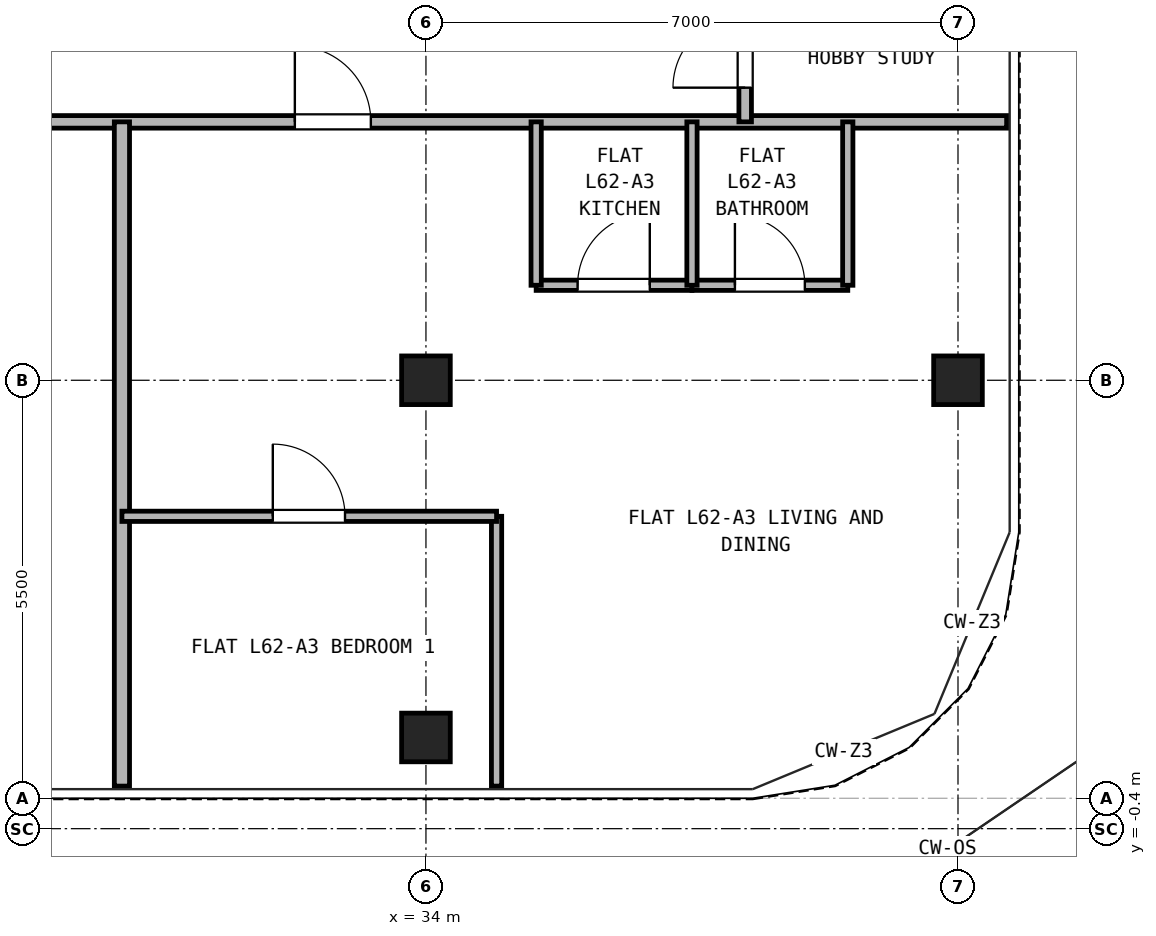
"""IFC4 building model, lengths in metres.
Left out: names, types, materials, properties, quantities, classifications, styles, units other than length and angle.
Written with IfcOpenShell. Run it as: python <this file> out.ifc"""

import sys

from ifc_helpers import new_model, si_unit, direction, frame, frame_2d, origin, origin_2d, place, context, subcontext, project, spatial, rectangle, hollow_rectangle, extrude, source, transform, mapped, element, fill, save


model = new_model("IFC4")
c1 = context("Model", 3, precision=1e-05, world=origin(), true_north=direction((0.0, 1.0)))
c2 = subcontext(c1, "Body", "Model", "MODEL_VIEW")
j1 = project(units=[si_unit("LENGTHUNIT", "METRE"), si_unit("PLANEANGLEUNIT", "RADIAN")], contexts=[c1])
p1 = place(None, origin())
s1 = spatial("IfcSite", under=j1, at=p1, CompositionType="ELEMENT")
p2 = place(p1, origin())
s2 = spatial("IfcBuilding", under=s1, at=p2, CompositionType="ELEMENT")
p3 = place(p2, frame((0.0, 0.0, 220.1)))
s3 = spatial("IfcBuildingStorey", under=s2, at=p3, CompositionType="ELEMENT", Elevation=220.1)
m1 = source(origin(), c2, "Body", "SweptSolid", [
    extrude(hollow_rectangle(XDim=0.64, YDim=0.64, WallThickness=0.035, at=origin_2d()), origin(), (0.0, 0.0, 1.0), 2.98),
])
for number, where, z_axis, x_axis in (
    (1, (34.0, 0.8, 0.0), (0.0, 0.0, 1.0), (1.0, 0.0, 0.0)),
    (2, (41.0, 5.5, 0.0), (0.0, 0.0, 1.0), (1.0, 0.0, 0.0)),
    (3, (34.0, 5.5, 0.0), (0.0, 0.0, 1.0), (1.0, 0.0, 0.0)),
):
    element("IfcColumn", number, at=place(p3, frame(where, z_axis=z_axis, x_axis=x_axis)), inside=s3, PredefinedType="COLUMN", context=c2, shape_type="MappedRepresentation", body=[
        mapped(m1, transform((0.0, 0.0, 0.0), x_axis=(1.0, 0.0, 0.0), y_axis=(0.0, 1.0, 0.0), z_axis=(0.0, 0.0, 1.0), scale=1.0)),
    ])
p4 = place(p3, frame((5.36, 8.9, 0.0), z_axis=(0.0, 0.0, 1.0), x_axis=(1.0, 0.0, 0.0)))
e4 = element("IfcWall", 4, at=p4, inside=s3, PredefinedType="PARTITIONING", context=c2, shape_type="SweptSolid", body=[
    extrude(rectangle(XDim=36.28, YDim=0.165, at=frame_2d((18.14, 0.0))), origin(), (0.0, 0.0, 1.0), 2.98),
])
p5 = place(p4, frame((8.865, 0.0, 0.0)))
e5 = element("IfcOpeningElement", 5, at=p5, cuts=e4, PredefinedType="OPENING", context=c2, shape_type="SweptSolid", body=[
    extrude(rectangle(XDim=1.0, YDim=2.15, at=frame_2d((0.5, 1.075))), frame((0.0, 0.093, 0.0), z_axis=(0.0, -1.0, 0.0), x_axis=(1.0, 0.0, 0.0)), (0.0, 0.0, 1.0), 0.185),
])
p6 = place(p4, frame((14.665, 0.0, 0.0)))
e6 = element("IfcOpeningElement", 6, at=p6, cuts=e4, PredefinedType="OPENING", context=c2, shape_type="SweptSolid", body=[
    extrude(rectangle(XDim=1.0, YDim=2.15, at=frame_2d((0.5, 1.075))), frame((0.0, 0.093, 0.0), z_axis=(0.0, -1.0, 0.0), x_axis=(1.0, 0.0, 0.0)), (0.0, 0.0, 1.0), 0.185),
])
p7 = place(p4, frame((26.915, 0.0, 0.0)))
e7 = element("IfcOpeningElement", 7, at=p7, cuts=e4, PredefinedType="OPENING", context=c2, shape_type="SweptSolid", body=[
    extrude(rectangle(XDim=1.0, YDim=2.15, at=frame_2d((0.5, 1.075))), frame((0.0, 0.093, 0.0), z_axis=(0.0, -1.0, 0.0), x_axis=(1.0, 0.0, 0.0)), (0.0, 0.0, 1.0), 0.185),
])
p8 = place(p3, frame((38.2, 8.9, 0.0), z_axis=(0.0, 0.0, 1.0), x_axis=(0.0, 1.0, 0.0)))
e8 = element("IfcWall", 8, at=p8, inside=s3, PredefinedType="PARTITIONING", context=c2, shape_type="SweptSolid", body=[
    extrude(rectangle(XDim=2.0, YDim=0.165, at=frame_2d((1.0, 0.0))), origin(), (0.0, 0.0, 1.0), 2.98),
])
p9 = place(p8, frame((0.45, 0.0, 0.0)))
e9 = element("IfcOpeningElement", 9, at=p9, cuts=e8, PredefinedType="OPENING", context=c2, shape_type="SweptSolid", body=[
    extrude(rectangle(XDim=0.95, YDim=2.15, at=frame_2d((0.475, 1.075))), frame((0.0, 0.093, 0.0), z_axis=(0.0, -1.0, 0.0), x_axis=(1.0, 0.0, 0.0)), (0.0, 0.0, 1.0), 0.185),
])
p10 = place(p3, frame((30.0, 0.16, 0.0), z_axis=(0.0, 0.0, 1.0), x_axis=(0.0, 1.0, 0.0)))
e10 = element("IfcWall", 10, at=p10, inside=s3, PredefinedType="PARTITIONING", context=c2, shape_type="SweptSolid", body=[
    extrude(rectangle(XDim=8.74, YDim=0.2, at=frame_2d((4.37, 0.0))), origin(), (0.0, 0.0, 1.0), 2.98),
])
p11 = place(p3, frame((35.45, 6.75, 0.0), z_axis=(0.0, 0.0, 1.0), x_axis=(1.0, 0.0, 0.0)))
e11 = element("IfcWall", 11, at=p11, inside=s3, PredefinedType="PARTITIONING", context=c2, shape_type="SweptSolid", body=[
    extrude(rectangle(XDim=2.05, YDim=0.135, at=frame_2d((1.025, 0.0))), origin(), (0.0, 0.0, 1.0), 2.98),
])
p12 = place(p11, frame((0.545, 0.0, 0.0)))
e12 = element("IfcOpeningElement", 12, at=p12, cuts=e11, PredefinedType="OPENING", context=c2, shape_type="SweptSolid", body=[
    extrude(rectangle(XDim=0.95, YDim=2.15, at=frame_2d((0.475, 1.075))), frame((0.0, 0.077, 0.0), z_axis=(0.0, -1.0, 0.0), x_axis=(1.0, 0.0, 0.0)), (0.0, 0.0, 1.0), 0.155),
])
p13 = place(p3, frame((37.5, 6.75, 0.0), z_axis=(0.0, 0.0, 1.0), x_axis=(1.0, 0.0, 0.0)))
e13 = element("IfcWall", 13, at=p13, inside=s3, PredefinedType="PARTITIONING", context=c2, shape_type="SweptSolid", body=[
    extrude(rectangle(XDim=2.05, YDim=0.135, at=frame_2d((1.025, 0.0))), origin(), (0.0, 0.0, 1.0), 2.98),
])
p14 = place(p13, frame((0.565, 0.0, 0.0)))
e14 = element("IfcOpeningElement", 14, at=p14, cuts=e13, PredefinedType="OPENING", context=c2, shape_type="SweptSolid", body=[
    extrude(rectangle(XDim=0.92, YDim=2.1, at=frame_2d((0.46, 1.05))), frame((0.0, 0.077, 0.0), z_axis=(0.0, -1.0, 0.0), x_axis=(1.0, 0.0, 0.0)), (0.0, 0.0, 1.0), 0.155),
])
for number, where, z_axis, x_axis in (
    (15, (35.45, 6.75, 0.0), (0.0, 0.0, 1.0), (0.0, 1.0, 0.0)),
    (16, (37.5, 6.75, 0.0), (0.0, 0.0, 1.0), (0.0, 1.0, 0.0)),
    (17, (39.55, 6.75, 0.0), (0.0, 0.0, 1.0), (0.0, 1.0, 0.0)),
):
    element("IfcWall", number, at=place(p3, frame(where, z_axis=z_axis, x_axis=x_axis)), inside=s3, PredefinedType="PARTITIONING", context=c2, shape_type="SweptSolid", body=[
        extrude(rectangle(XDim=2.15, YDim=0.135, at=frame_2d((1.075, 0.0))), origin(), (0.0, 0.0, 1.0), 2.98),
    ])
p15 = place(p3, frame((34.929, 0.16, 0.0), z_axis=(0.0, 0.0, 1.0), x_axis=(0.0, 1.0, 0.0)))
e18 = element("IfcWall", 18, at=p15, inside=s3, PredefinedType="PARTITIONING", context=c2, shape_type="SweptSolid", body=[
    extrude(rectangle(XDim=3.55, YDim=0.135, at=frame_2d((1.775, 0.0))), origin(), (0.0, 0.0, 1.0), 2.98),
])
p16 = place(p3, frame((30.0, 3.71, 0.0), z_axis=(0.0, 0.0, 1.0), x_axis=(1.0, 0.0, 0.0)))
e19 = element("IfcWall", 19, at=p16, inside=s3, PredefinedType="PARTITIONING", context=c2, shape_type="SweptSolid", body=[
    extrude(rectangle(XDim=4.929, YDim=0.135, at=frame_2d((2.464, 0.0))), origin(), (0.0, 0.0, 1.0), 2.98),
])
p17 = place(p16, frame((1.985, 0.0, 0.0)))
e20 = element("IfcOpeningElement", 20, at=p17, cuts=e19, PredefinedType="OPENING", context=c2, shape_type="SweptSolid", body=[
    extrude(rectangle(XDim=0.95, YDim=2.15, at=frame_2d((0.475, 1.075))), frame((0.0, 0.077, 0.0), z_axis=(0.0, -1.0, 0.0), x_axis=(1.0, 0.0, 0.0)), (0.0, 0.0, 1.0), 0.155),
])
p18 = place(p12, origin())
e21 = element("IfcDoor", 21, at=p18, inside=s3, OperationType="SINGLE_SWING_RIGHT", PredefinedType="DOOR", context=c2, shape_type="SweptSolid", body=[
    extrude(rectangle(XDim=0.95, YDim=2.15, at=frame_2d((0.475, 1.075))), frame((0.0, 0.025, 0.0), z_axis=(0.0, -1.0, 0.0), x_axis=(1.0, 0.0, 0.0)), (0.0, 0.0, 1.0), 0.05),
])
fill(e12, e21)
p19 = place(p14, origin())
e22 = element("IfcDoor", 22, at=p19, inside=s3, OperationType="SINGLE_SWING_LEFT", PredefinedType="DOOR", context=c2, shape_type="SweptSolid", body=[
    extrude(rectangle(XDim=0.92, YDim=2.1, at=frame_2d((0.46, 1.05))), frame((0.0, 0.025, 0.0), z_axis=(0.0, -1.0, 0.0), x_axis=(1.0, 0.0, 0.0)), (0.0, 0.0, 1.0), 0.05),
])
fill(e14, e22)
p20 = place(p17, frame((0.95, 0.0, 0.0), z_axis=(0.0, 0.0, 1.0), x_axis=(-1.0, 0.0, 0.0)))
e23 = element("IfcDoor", 23, at=p20, inside=s3, OperationType="SINGLE_SWING_LEFT", PredefinedType="DOOR", context=c2, shape_type="SweptSolid", body=[
    extrude(rectangle(XDim=0.95, YDim=2.15, at=frame_2d((0.475, 1.075))), frame((0.0, 0.025, 0.0), z_axis=(0.0, -1.0, 0.0), x_axis=(1.0, 0.0, 0.0)), (0.0, 0.0, 1.0), 0.05),
])
fill(e20, e23)
p21 = place(p7, frame((1.0, 0.0, 0.0), z_axis=(0.0, 0.0, 1.0), x_axis=(-1.0, 0.0, 0.0)))
e24 = element("IfcDoor", 24, at=p21, inside=s3, OperationType="SINGLE_SWING_LEFT", PredefinedType="DOOR", context=c2, shape_type="SweptSolid", body=[
    extrude(rectangle(XDim=1.0, YDim=2.15, at=frame_2d((0.5, 1.075))), frame((0.0, 0.025, 0.0), z_axis=(0.0, -1.0, 0.0), x_axis=(1.0, 0.0, 0.0)), (0.0, 0.0, 1.0), 0.05),
])
fill(e7, e24)
p22 = place(p9, origin())
e25 = element("IfcDoor", 25, at=p22, inside=s3, OperationType="SINGLE_SWING_LEFT", PredefinedType="DOOR", context=c2, shape_type="SweptSolid", body=[
    extrude(rectangle(XDim=0.95, YDim=2.15, at=frame_2d((0.475, 1.075))), frame((0.0, 0.025, 0.0), z_axis=(0.0, -1.0, 0.0), x_axis=(1.0, 0.0, 0.0)), (0.0, 0.0, 1.0), 0.05),
])
fill(e9, e25)
save(model, sys.argv[1])
